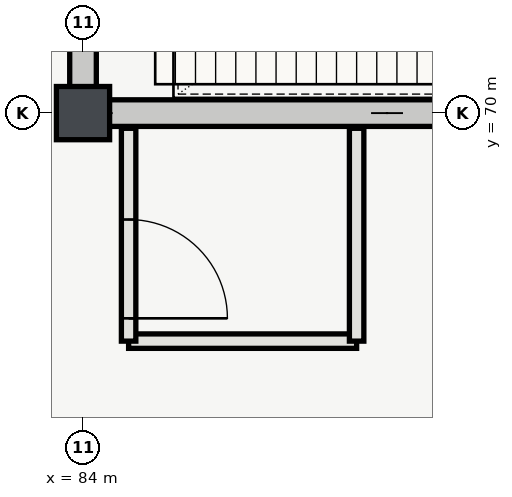
"""IFC4 building model, lengths in metres.
Left out: names, types, materials, properties, quantities, classifications, styles, units other than length and angle.
Written with IfcOpenShell. Run it as: python <this file> out.ifc"""

import sys

from ifc_helpers import new_model, si_unit, direction, frame, frame_2d, origin, origin_2d, place, context, subcontext, project, spatial, rectangle, extrude, element, fill, save


model = new_model("IFC4")
c1 = context("Model", 3, precision=1e-05, world=origin(), true_north=direction((0.0, 1.0)))
c2 = subcontext(c1, "Body", "Model", "MODEL_VIEW")
j1 = project(units=[si_unit("LENGTHUNIT", "METRE"), si_unit("PLANEANGLEUNIT", "RADIAN")], contexts=[c1])
p1 = place(None, origin())
s1 = spatial("IfcSite", under=j1, at=p1, CompositionType="ELEMENT")
p2 = place(p1, origin())
s2 = spatial("IfcBuilding", under=s1, at=p2, CompositionType="ELEMENT")
p3 = place(p2, frame((0.0, 0.0, 5.4)))
s3 = spatial("IfcBuildingStorey", under=s2, at=p3, CompositionType="ELEMENT", Elevation=5.4)
p4 = place(p3, frame((84.0, 70.0, 0.0), z_axis=(0.0, 0.0, 1.0), x_axis=(1.0, 0.0, 0.0)))
e1 = element("IfcColumn", 1, at=p4, inside=s3, PredefinedType="COLUMN", context=c2, shape_type="SweptSolid", body=[
    extrude(rectangle(XDim=0.7, YDim=0.7, at=origin_2d()), origin(), (0.0, 0.0, 1.0), 5.4),
])
p5 = place(p3, frame((83.825, 70.0, 0.0), z_axis=(0.0, 0.0, 1.0), x_axis=(1.0, 0.0, 0.0)))
e2 = element("IfcWall", 2, at=p5, inside=s3, PredefinedType="SHEAR", context=c2, shape_type="SweptSolid", body=[
    extrude(rectangle(XDim=8.35, YDim=0.35, at=frame_2d((4.175, 0.0))), origin(), (0.0, 0.0, 1.0), 5.12),
])
p6 = place(p3, frame((84.0, 70.175, 0.0), z_axis=(0.0, 0.0, 1.0), x_axis=(0.0, 1.0, 0.0)))
e3 = element("IfcWall", 3, at=p6, inside=s3, PredefinedType="SHEAR", context=c2, shape_type="SweptSolid", body=[
    extrude(rectangle(XDim=7.65, YDim=0.35, at=frame_2d((3.825, 0.0))), origin(), (0.0, 0.0, 1.0), 5.12),
])
p7 = place(p6, frame((1.625, 0.0, 0.0)))
e4 = element("IfcOpeningElement", 4, at=p7, cuts=e3, PredefinedType="OPENING", context=c2, shape_type="SweptSolid", body=[
    extrude(rectangle(XDim=1.4, YDim=2.2, at=frame_2d((0.7, 1.1))), frame((0.0, 0.185, 0.0), z_axis=(0.0, -1.0, 0.0), x_axis=(1.0, 0.0, 0.0)), (0.0, 0.0, 1.0), 0.37),
])
p8 = place(p3, frame((84.6, 67.0, 0.0), z_axis=(0.0, 0.0, 1.0), x_axis=(1.0, 0.0, 0.0)))
e5 = element("IfcWall", 5, at=p8, inside=s3, PredefinedType="PARTITIONING", context=c2, shape_type="SweptSolid", body=[
    extrude(rectangle(XDim=3.0, YDim=0.19, at=frame_2d((1.5, 0.0))), origin(), (0.0, 0.0, 1.0), 5.12),
])
p9 = place(p3, frame((84.6, 69.8, 0.0), z_axis=(0.0, 0.0, 1.0), x_axis=(0.0, -1.0, 0.0)))
e6 = element("IfcWall", 6, at=p9, inside=s3, PredefinedType="PARTITIONING", context=c2, shape_type="SweptSolid", body=[
    extrude(rectangle(XDim=2.8, YDim=0.19, at=frame_2d((1.4, 0.0))), origin(), (0.0, 0.0, 1.0), 5.12),
])
p10 = place(p9, frame((1.2, 0.0, 0.0)))
e7 = element("IfcOpeningElement", 7, at=p10, cuts=e6, PredefinedType="OPENING", context=c2, shape_type="SweptSolid", body=[
    extrude(rectangle(XDim=1.3, YDim=2.2, at=frame_2d((0.65, 1.1))), frame((0.0, 0.105, 0.0), z_axis=(0.0, -1.0, 0.0), x_axis=(1.0, 0.0, 0.0)), (0.0, 0.0, 1.0), 0.21),
])
p11 = place(p3, frame((87.6, 67.0, 0.0), z_axis=(0.0, 0.0, 1.0), x_axis=(0.0, 1.0, 0.0)))
e8 = element("IfcWall", 8, at=p11, inside=s3, PredefinedType="PARTITIONING", context=c2, shape_type="SweptSolid", body=[
    extrude(rectangle(XDim=2.8, YDim=0.19, at=frame_2d((1.4, 0.0))), origin(), (0.0, 0.0, 1.0), 5.12),
])
p12 = place(p10, origin())
e9 = element("IfcDoor", 9, at=p12, inside=s3, OperationType="SINGLE_SWING_RIGHT", PredefinedType="DOOR", context=c2, shape_type="SweptSolid", body=[
    extrude(rectangle(XDim=1.3, YDim=2.2, at=frame_2d((0.65, 1.1))), frame((0.0, 0.025, 0.0), z_axis=(0.0, -1.0, 0.0), x_axis=(1.0, 0.0, 0.0)), (0.0, 0.0, 1.0), 0.05),
])
fill(e7, e9)
save(model, sys.argv[1])
